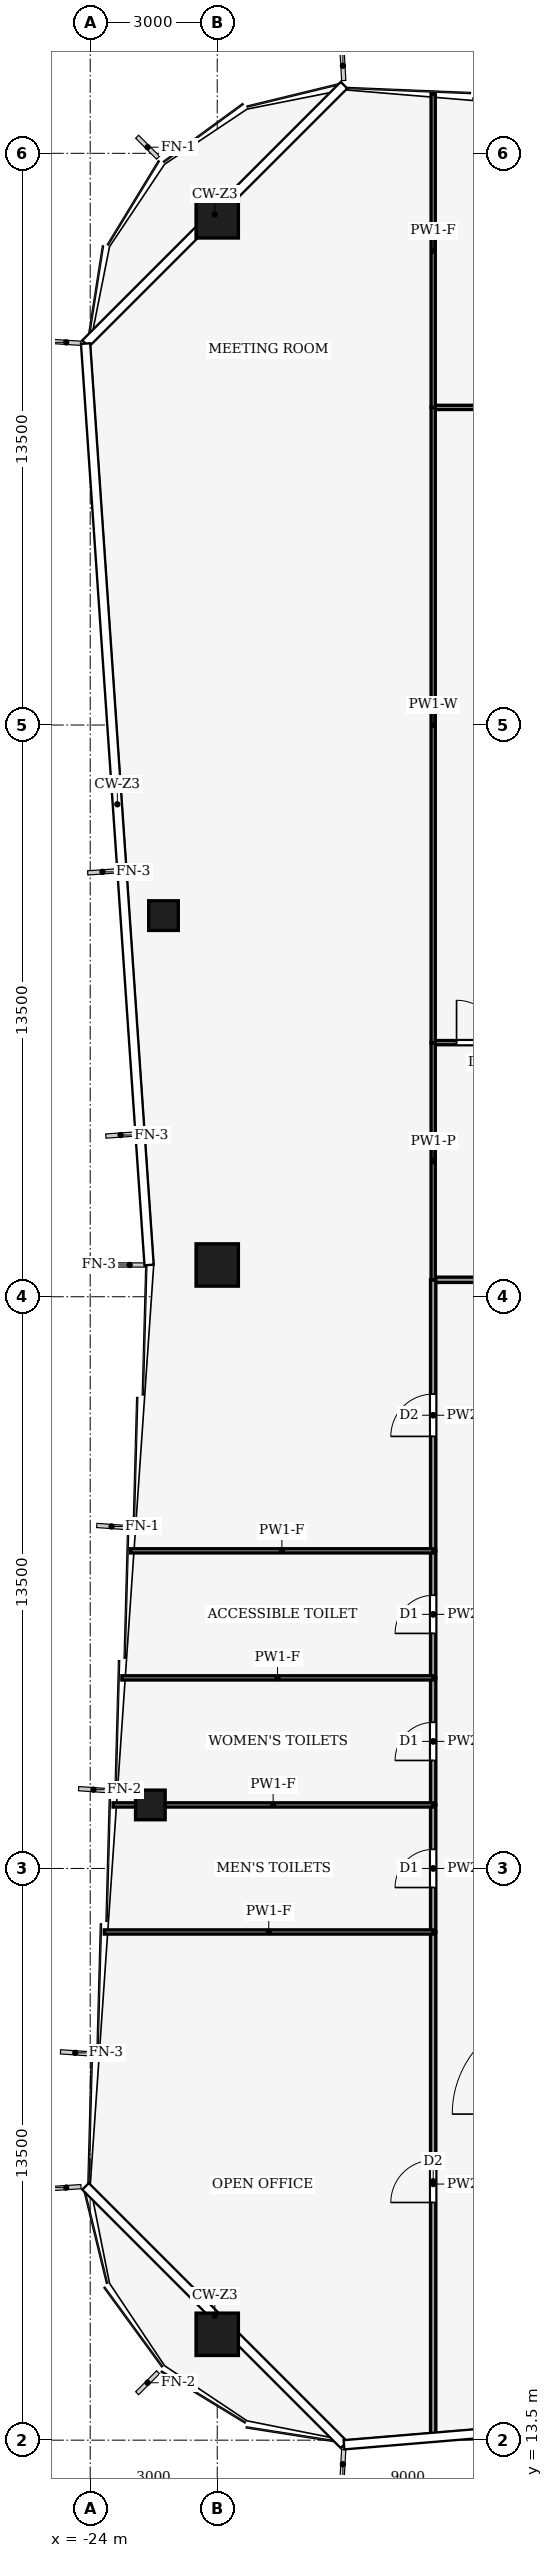
"""IFC4 building model, lengths in metres.
Left out: names, types, materials, properties, quantities, classifications, styles, units other than length and angle.
Written with IfcOpenShell. Run it as: python <this file> out.ifc"""

import sys

from ifc_helpers import new_model, si_unit, direction, frame, frame_2d, origin, origin_2d, place, context, subcontext, project, spatial, rectangle, hollow_rectangle, extrude, element, fill, save


model = new_model("IFC4")
c1 = context("Model", 3, precision=1e-05, world=origin(), true_north=direction((0.0, 1.0)))
c2 = subcontext(c1, "Body", "Model", "MODEL_VIEW")
j1 = project(units=[si_unit("LENGTHUNIT", "METRE"), si_unit("PLANEANGLEUNIT", "RADIAN")], contexts=[c1])
p1 = place(None, origin())
s1 = spatial("IfcSite", under=j1, at=p1, CompositionType="ELEMENT")
p2 = place(p1, origin())
s2 = spatial("IfcBuilding", under=s1, at=p2, CompositionType="ELEMENT")
p3 = place(p2, frame((0.0, 0.0, 194.0)))
s3 = spatial("IfcBuildingStorey", under=s2, at=p3, CompositionType="ELEMENT", Elevation=194.0)
for number, where, z_axis, x_axis in (
    (1, (-21.0, 66.0, 0.0), (0.0, 0.0, 1.0), (1.0, 0.0, 0.0)),
    (2, (-21.0, 16.0, 0.0), (0.0, 0.0, 1.0), (1.0, 0.0, 0.0)),
    (3, (-21.0, 41.25, 0.0), (0.0, 0.0, 1.0), (1.0, 0.0, 0.0)),
):
    element("IfcColumn", number, at=place(p3, frame(where, z_axis=z_axis, x_axis=x_axis)), inside=s3, PredefinedType="COLUMN", context=c2, shape_type="SweptSolid", body=[
        extrude(hollow_rectangle(XDim=1.0, YDim=1.0, WallThickness=0.06, at=origin_2d()), origin(), (0.0, 0.0, 1.0), 4.0),
    ])
for number, where, z_axis, x_axis in (
    (4, (-22.579, 28.5, 0.0), (0.0, 0.0, 1.0), (1.0, 0.0, 0.0)),
    (5, (-22.269, 49.5, 0.0), (0.0, 0.0, 1.0), (1.0, 0.0, 0.0)),
):
    element("IfcColumn", number, at=place(p3, frame(where, z_axis=z_axis, x_axis=x_axis)), inside=s3, PredefinedType="COLUMN", context=c2, shape_type="SweptSolid", body=[
        extrude(hollow_rectangle(XDim=0.7, YDim=0.7, WallThickness=0.03, at=origin_2d()), origin(), (0.0, 0.0, 1.0), 4.0),
    ])
p4 = place(p3, frame((-15.9, 40.9, 0.0), z_axis=(0.0, 0.0, 1.0), x_axis=(1.0, 0.0, 0.0)))
e6 = element("IfcWall", 6, at=p4, inside=s3, PredefinedType="PARTITIONING", context=c2, shape_type="SweptSolid", body=[
    extrude(rectangle(XDim=6.9, YDim=0.125, at=frame_2d((3.45, 0.0))), origin(), (0.0, 0.0, 1.0), 3.44),
])
p5 = place(p4, frame((2.95, 0.0, 0.0)))
e7 = element("IfcOpeningElement", 7, at=p5, cuts=e6, PredefinedType="OPENING", context=c2, shape_type="SweptSolid", body=[
    extrude(rectangle(XDim=1.0, YDim=2.1, at=frame_2d((0.5, 1.05))), frame((0.0, 0.073, 0.0), z_axis=(0.0, -1.0, 0.0), x_axis=(1.0, 0.0, 0.0)), (0.0, 0.0, 1.0), 0.145),
])
p6 = place(p3, frame((-15.9, 13.595, 0.0), z_axis=(0.0, 0.0, 1.0), x_axis=(0.0, 1.0, 0.0)))
e8 = element("IfcWall", 8, at=p6, inside=s3, PredefinedType="PARTITIONING", context=c2, shape_type="SweptSolid", body=[
    extrude(rectangle(XDim=11.905, YDim=0.125, at=frame_2d((5.953, 0.0))), origin(), (0.0, 0.0, 1.0), 3.04),
])
p7 = place(p6, frame((5.518, 0.0, 0.0)))
e9 = element("IfcOpeningElement", 9, at=p7, cuts=e8, PredefinedType="OPENING", context=c2, shape_type="SweptSolid", body=[
    extrude(rectangle(XDim=1.0, YDim=2.1, at=frame_2d((0.5, 1.05))), frame((0.0, 0.073, 0.0), z_axis=(0.0, -1.0, 0.0), x_axis=(1.0, 0.0, 0.0)), (0.0, 0.0, 1.0), 0.145),
])
p8 = place(p3, frame((-15.9, 25.5, 0.0), z_axis=(0.0, 0.0, 1.0), x_axis=(0.0, 1.0, 0.0)))
e10 = element("IfcWall", 10, at=p8, inside=s3, PredefinedType="PARTITIONING", context=c2, shape_type="SweptSolid", body=[
    extrude(rectangle(XDim=3.0, YDim=0.125, at=frame_2d((1.5, 0.0))), origin(), (0.0, 0.0, 1.0), 3.87),
])
p9 = place(p8, frame((1.05, 0.0, 0.0)))
e11 = element("IfcOpeningElement", 11, at=p9, cuts=e10, PredefinedType="OPENING", context=c2, shape_type="SweptSolid", body=[
    extrude(rectangle(XDim=0.9, YDim=2.1, at=frame_2d((0.45, 1.05))), frame((0.0, 0.073, 0.0), z_axis=(0.0, -1.0, 0.0), x_axis=(1.0, 0.0, 0.0)), (0.0, 0.0, 1.0), 0.145),
])
p10 = place(p3, frame((-15.9, 28.5, 0.0), z_axis=(0.0, 0.0, 1.0), x_axis=(0.0, 1.0, 0.0)))
e12 = element("IfcWall", 12, at=p10, inside=s3, PredefinedType="PARTITIONING", context=c2, shape_type="SweptSolid", body=[
    extrude(rectangle(XDim=3.0, YDim=0.125, at=frame_2d((1.5, 0.0))), origin(), (0.0, 0.0, 1.0), 3.87),
])
p11 = place(p10, frame((1.05, 0.0, 0.0)))
e13 = element("IfcOpeningElement", 13, at=p11, cuts=e12, PredefinedType="OPENING", context=c2, shape_type="SweptSolid", body=[
    extrude(rectangle(XDim=0.9, YDim=2.1, at=frame_2d((0.45, 1.05))), frame((0.0, 0.073, 0.0), z_axis=(0.0, -1.0, 0.0), x_axis=(1.0, 0.0, 0.0)), (0.0, 0.0, 1.0), 0.145),
])
p12 = place(p3, frame((-15.9, 31.5, 0.0), z_axis=(0.0, 0.0, 1.0), x_axis=(0.0, 1.0, 0.0)))
e14 = element("IfcWall", 14, at=p12, inside=s3, PredefinedType="PARTITIONING", context=c2, shape_type="SweptSolid", body=[
    extrude(rectangle(XDim=3.0, YDim=0.125, at=frame_2d((1.5, 0.0))), origin(), (0.0, 0.0, 1.0), 3.87),
])
p13 = place(p12, frame((1.05, 0.0, 0.0)))
e15 = element("IfcOpeningElement", 15, at=p13, cuts=e14, PredefinedType="OPENING", context=c2, shape_type="SweptSolid", body=[
    extrude(rectangle(XDim=0.9, YDim=2.1, at=frame_2d((0.45, 1.05))), frame((0.0, 0.073, 0.0), z_axis=(0.0, -1.0, 0.0), x_axis=(1.0, 0.0, 0.0)), (0.0, 0.0, 1.0), 0.145),
])
p14 = place(p3, frame((-15.9, 34.5, 0.0), z_axis=(0.0, 0.0, 1.0), x_axis=(0.0, 1.0, 0.0)))
e16 = element("IfcWall", 16, at=p14, inside=s3, PredefinedType="PARTITIONING", context=c2, shape_type="SweptSolid", body=[
    extrude(rectangle(XDim=6.404, YDim=0.125, at=frame_2d((3.202, 0.0))), origin(), (0.0, 0.0, 1.0), 3.14),
])
p15 = place(p14, frame((2.702, 0.0, 0.0)))
e17 = element("IfcOpeningElement", 17, at=p15, cuts=e16, PredefinedType="OPENING", context=c2, shape_type="SweptSolid", body=[
    extrude(rectangle(XDim=1.0, YDim=2.1, at=frame_2d((0.5, 1.05))), frame((0.0, 0.073, 0.0), z_axis=(0.0, -1.0, 0.0), x_axis=(1.0, 0.0, 0.0)), (0.0, 0.0, 1.0), 0.145),
])
p16 = place(p3, frame((-15.9, 46.5, 0.0), z_axis=(0.0, 0.0, 1.0), x_axis=(1.0, 0.0, 0.0)))
e18 = element("IfcWall", 18, at=p16, inside=s3, PredefinedType="PARTITIONING", context=c2, shape_type="SweptSolid", body=[
    extrude(rectangle(XDim=6.904, YDim=0.1, at=frame_2d((3.452, 0.0))), origin(), (0.0, 0.0, 1.0), 3.44),
])
p17 = place(p16, frame((0.552, 0.0, 0.0)))
e19 = element("IfcOpeningElement", 19, at=p17, cuts=e18, PredefinedType="OPENING", context=c2, shape_type="SweptSolid", body=[
    extrude(rectangle(XDim=1.0, YDim=2.1, at=frame_2d((0.5, 1.05))), frame((0.0, 0.06, 0.0), z_axis=(0.0, -1.0, 0.0), x_axis=(1.0, 0.0, 0.0)), (0.0, 0.0, 1.0), 0.12),
])
p18 = place(p3, frame((-15.9, 46.504, 0.0), z_axis=(0.0, 0.0, 1.0), x_axis=(0.0, -1.0, 0.0)))
e20 = element("IfcWall", 20, at=p18, inside=s3, PredefinedType="PARTITIONING", context=c2, shape_type="SweptSolid", body=[
    extrude(rectangle(XDim=5.608, YDim=0.1, at=frame_2d((2.804, 0.0))), origin(), (0.0, 0.0, 1.0), 3.44),
])
p19 = place(p3, frame((-15.9, 61.5, 0.0), z_axis=(0.0, 0.0, 1.0), x_axis=(1.0, 0.0, 0.0)))
e21 = element("IfcWall", 21, at=p19, inside=s3, PredefinedType="PARTITIONING", context=c2, shape_type="SweptSolid", body=[
    extrude(rectangle(XDim=6.9, YDim=0.1, at=frame_2d((3.45, 0.0))), origin(), (0.0, 0.0, 1.0), 3.24),
])
p20 = place(p19, frame((2.95, 0.0, 0.0)))
e22 = element("IfcOpeningElement", 22, at=p20, cuts=e21, PredefinedType="OPENING", context=c2, shape_type="SweptSolid", body=[
    extrude(rectangle(XDim=1.0, YDim=2.1, at=frame_2d((0.5, 1.05))), frame((0.0, 0.06, 0.0), z_axis=(0.0, -1.0, 0.0), x_axis=(1.0, 0.0, 0.0)), (0.0, 0.0, 1.0), 0.12),
])
p21 = place(p3, frame((-15.9, 61.504, 0.0), z_axis=(0.0, 0.0, 1.0), x_axis=(0.0, -1.0, 0.0)))
e23 = element("IfcWall", 23, at=p21, inside=s3, PredefinedType="PARTITIONING", context=c2, shape_type="SweptSolid", body=[
    extrude(rectangle(XDim=15.008, YDim=0.1, at=frame_2d((7.504, 0.0))), origin(), (0.0, 0.0, 1.0), 3.24),
])
p22 = place(p3, frame((-15.9, 68.905, 0.0), z_axis=(0.0, 0.0, 1.0), x_axis=(0.0, -1.0, 0.0)))
e24 = element("IfcWall", 24, at=p22, inside=s3, PredefinedType="PARTITIONING", context=c2, shape_type="SweptSolid", body=[
    extrude(rectangle(XDim=7.409, YDim=0.1, at=frame_2d((3.705, 0.0))), origin(), (0.0, 0.0, 1.0), 3.04),
])
p23 = place(p3, frame((-15.9, 25.5, 0.0), z_axis=(0.0, 0.0, 1.0), x_axis=(-1.0, 0.0, 0.0)))
e25 = element("IfcWall", 25, at=p23, inside=s3, PredefinedType="PARTITIONING", context=c2, shape_type="SweptSolid", body=[
    extrude(rectangle(XDim=7.766, YDim=0.1, at=frame_2d((3.883, 0.0))), origin(), (0.0, 0.0, 1.0), 3.04),
])
p24 = place(p3, frame((-15.9, 28.5, 0.0), z_axis=(0.0, 0.0, 1.0), x_axis=(-1.0, 0.0, 0.0)))
e26 = element("IfcWall", 26, at=p24, inside=s3, PredefinedType="PARTITIONING", context=c2, shape_type="SweptSolid", body=[
    extrude(rectangle(XDim=7.559, YDim=0.1, at=frame_2d((3.78, 0.0))), origin(), (0.0, 0.0, 1.0), 3.04),
])
p25 = place(p3, frame((-15.9, 31.5, 0.0), z_axis=(0.0, 0.0, 1.0), x_axis=(-1.0, 0.0, 0.0)))
e27 = element("IfcWall", 27, at=p25, inside=s3, PredefinedType="PARTITIONING", context=c2, shape_type="SweptSolid", body=[
    extrude(rectangle(XDim=7.353, YDim=0.1, at=frame_2d((3.676, 0.0))), origin(), (0.0, 0.0, 1.0), 3.04),
])
p26 = place(p3, frame((-15.9, 34.5, 0.0), z_axis=(0.0, 0.0, 1.0), x_axis=(-1.0, 0.0, 0.0)))
e28 = element("IfcWall", 28, at=p26, inside=s3, PredefinedType="PARTITIONING", context=c2, shape_type="SweptSolid", body=[
    extrude(rectangle(XDim=7.146, YDim=0.1, at=frame_2d((3.573, 0.0))), origin(), (0.0, 0.0, 1.0), 3.04),
])
p27 = place(p7, origin())
e29 = element("IfcDoor", 29, at=p27, inside=s3, OperationType="SINGLE_SWING_RIGHT", PredefinedType="DOOR", context=c2, shape_type="SweptSolid", body=[
    extrude(rectangle(XDim=1.0, YDim=2.1, at=frame_2d((0.5, 1.05))), frame((0.0, 0.025, 0.0), z_axis=(0.0, -1.0, 0.0), x_axis=(1.0, 0.0, 0.0)), (0.0, 0.0, 1.0), 0.05),
])
fill(e9, e29)
p28 = place(p9, origin())
e30 = element("IfcDoor", 30, at=p28, inside=s3, OperationType="SINGLE_SWING_RIGHT", PredefinedType="DOOR", context=c2, shape_type="SweptSolid", body=[
    extrude(rectangle(XDim=0.9, YDim=2.1, at=frame_2d((0.45, 1.05))), frame((0.0, 0.025, 0.0), z_axis=(0.0, -1.0, 0.0), x_axis=(1.0, 0.0, 0.0)), (0.0, 0.0, 1.0), 0.05),
])
fill(e11, e30)
p29 = place(p11, origin())
e31 = element("IfcDoor", 31, at=p29, inside=s3, OperationType="SINGLE_SWING_LEFT", PredefinedType="DOOR", context=c2, shape_type="SweptSolid", body=[
    extrude(rectangle(XDim=0.9, YDim=2.1, at=frame_2d((0.45, 1.05))), frame((0.0, 0.025, 0.0), z_axis=(0.0, -1.0, 0.0), x_axis=(1.0, 0.0, 0.0)), (0.0, 0.0, 1.0), 0.05),
])
fill(e13, e31)
p30 = place(p13, origin())
e32 = element("IfcDoor", 32, at=p30, inside=s3, OperationType="SINGLE_SWING_RIGHT", PredefinedType="DOOR", context=c2, shape_type="SweptSolid", body=[
    extrude(rectangle(XDim=0.9, YDim=2.1, at=frame_2d((0.45, 1.05))), frame((0.0, 0.025, 0.0), z_axis=(0.0, -1.0, 0.0), x_axis=(1.0, 0.0, 0.0)), (0.0, 0.0, 1.0), 0.05),
])
fill(e15, e32)
p31 = place(p15, origin())
e33 = element("IfcDoor", 33, at=p31, inside=s3, OperationType="SINGLE_SWING_LEFT", PredefinedType="DOOR", context=c2, shape_type="SweptSolid", body=[
    extrude(rectangle(XDim=1.0, YDim=2.1, at=frame_2d((0.5, 1.05))), frame((0.0, 0.025, 0.0), z_axis=(0.0, -1.0, 0.0), x_axis=(1.0, 0.0, 0.0)), (0.0, 0.0, 1.0), 0.05),
])
fill(e17, e33)
p32 = place(p17, origin())
e34 = element("IfcDoor", 34, at=p32, inside=s3, OperationType="SINGLE_SWING_LEFT", PredefinedType="DOOR", context=c2, shape_type="SweptSolid", body=[
    extrude(rectangle(XDim=1.0, YDim=2.1, at=frame_2d((0.5, 1.05))), frame((0.0, 0.025, 0.0), z_axis=(0.0, -1.0, 0.0), x_axis=(1.0, 0.0, 0.0)), (0.0, 0.0, 1.0), 0.05),
])
fill(e19, e34)
save(model, sys.argv[1])
